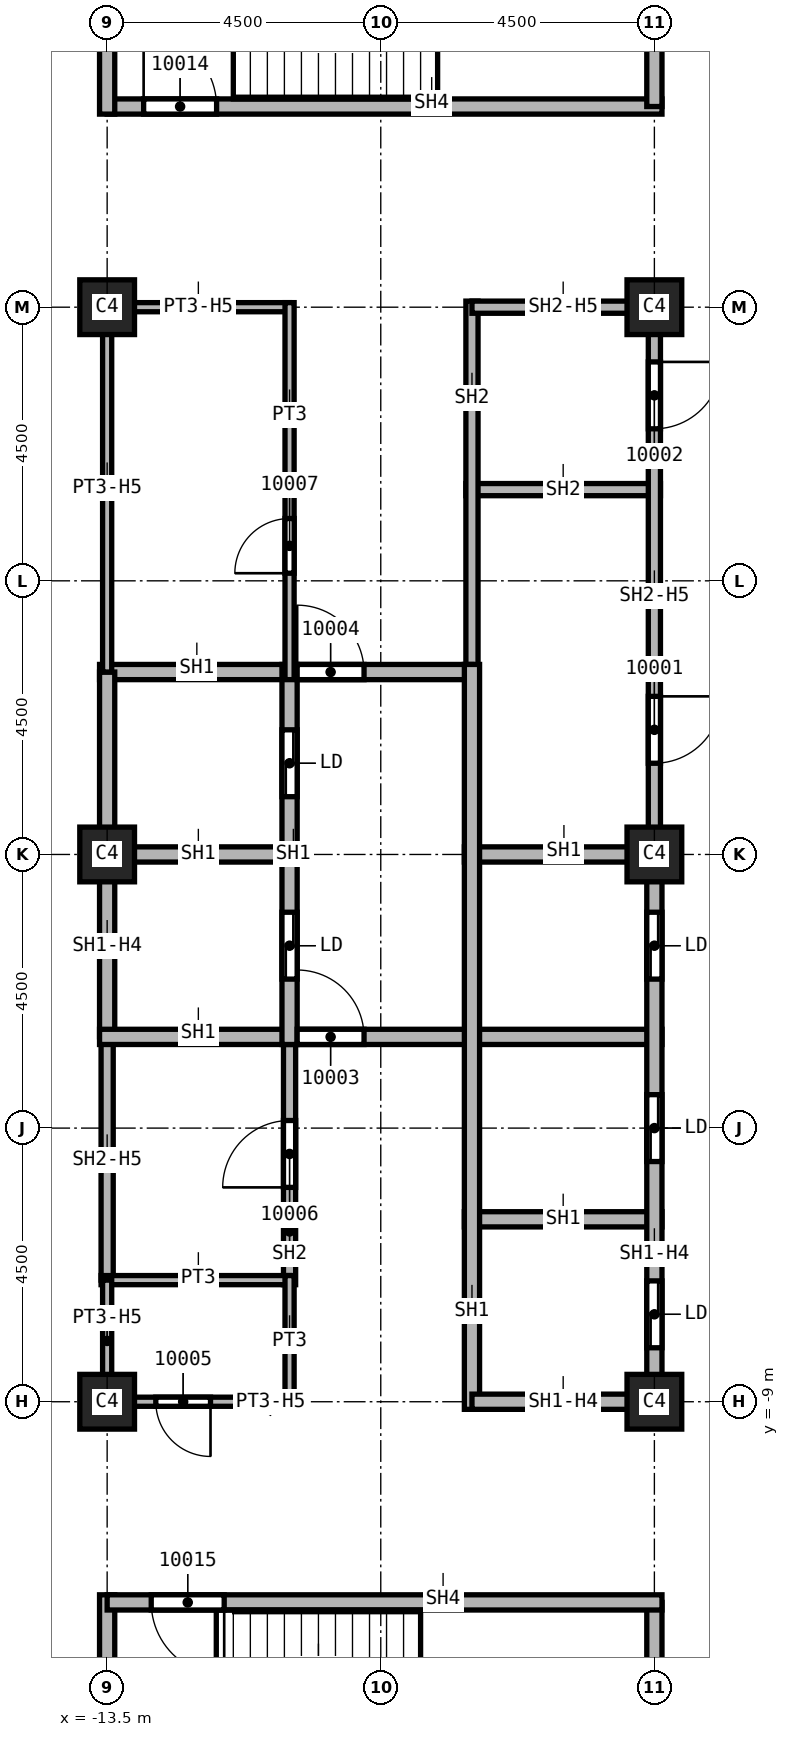
"""IFC4 building model, lengths in metres.
Left out: names, types, materials, properties, quantities, classifications, styles, units other than length and angle.
Written with IfcOpenShell. Run it as: python <this file> out.ifc"""

import sys

from ifc_helpers import new_model, si_unit, direction, frame, frame_2d, origin, origin_2d, place, context, subcontext, project, spatial, rectangle, extrude, element, fill, save


model = new_model("IFC4")
c1 = context("Model", 3, precision=1e-05, world=origin(), true_north=direction((0.0, 1.0)))
c2 = subcontext(c1, "Body", "Model", "MODEL_VIEW")
j1 = project(units=[si_unit("LENGTHUNIT", "METRE"), si_unit("PLANEANGLEUNIT", "RADIAN")], contexts=[c1])
p1 = place(None, origin())
s1 = spatial("IfcSite", under=j1, at=p1, CompositionType="ELEMENT")
p2 = place(p1, origin())
s2 = spatial("IfcBuilding", under=s1, at=p2, CompositionType="ELEMENT")
p3 = place(p2, frame((0.0, 0.0, 174.0)))
s3 = spatial("IfcBuildingStorey", under=s2, at=p3, CompositionType="ELEMENT", Elevation=174.0)
for number, where, z_axis, x_axis in (
    (1, (-4.5, 0.0, 0.0), (0.0, 0.0, 1.0), (1.0, 0.0, 0.0)),
    (2, (-4.5, 9.0, 0.0), (0.0, 0.0, 1.0), (1.0, 0.0, 0.0)),
    (3, (-4.5, -9.0, 0.0), (0.0, 0.0, 1.0), (1.0, 0.0, 0.0)),
    (4, (-13.5, 0.0, 0.0), (0.0, 0.0, 1.0), (1.0, 0.0, 0.0)),
    (5, (-13.5, 9.0, 0.0), (0.0, 0.0, 1.0), (1.0, 0.0, 0.0)),
    (6, (-13.5, -9.0, 0.0), (0.0, 0.0, 1.0), (1.0, 0.0, 0.0)),
):
    element("IfcColumn", number, at=place(p3, frame(where, z_axis=z_axis, x_axis=x_axis)), inside=s3, PredefinedType="COLUMN", context=c2, shape_type="SweptSolid", body=[
        extrude(rectangle(XDim=0.9, YDim=0.9, at=origin_2d()), origin(), (0.0, 0.0, 1.0), 3.59),
    ])
p4 = place(p3, frame((-13.5, -7.0, 0.0), z_axis=(0.0, 0.0, 1.0), x_axis=(0.0, 1.0, 0.0)))
e7 = element("IfcWall", 7, at=p4, inside=s3, PredefinedType="SOLIDWALL", context=c2, shape_type="SweptSolid", body=[
    extrude(rectangle(XDim=4.0, YDim=0.2, at=frame_2d((2.0, 0.0))), origin(), (0.0, 0.0, 1.0), 2.828),
])
p5 = place(p3, frame((-10.5, -7.075, 0.0), z_axis=(0.0, 0.0, 1.0), x_axis=(0.0, 1.0, 0.0)))
e8 = element("IfcWall", 8, at=p5, inside=s3, PredefinedType="SOLIDWALL", context=c2, shape_type="SweptSolid", body=[
    extrude(rectangle(XDim=4.2, YDim=0.2, at=frame_2d((2.1, 0.0))), origin(), (0.0, 0.0, 1.0), 3.59),
])
p6 = place(p5, frame((1.6, 0.0, 0.0)))
e9 = element("IfcOpeningElement", 9, at=p6, cuts=e8, PredefinedType="OPENING", context=c2, shape_type="SweptSolid", body=[
    extrude(rectangle(XDim=1.1, YDim=2.1, at=frame_2d((0.55, 1.05))), frame((0.0, 0.1, 0.0), z_axis=(0.0, -1.0, 0.0), x_axis=(1.0, 0.0, 0.0)), (0.0, 0.0, 1.0), 0.2),
])
p7 = place(p3, frame((-7.6, 6.0, 0.0), z_axis=(0.0, 0.0, 1.0), x_axis=(1.0, 0.0, 0.0)))
e10 = element("IfcWall", 10, at=p7, inside=s3, PredefinedType="SOLIDWALL", context=c2, shape_type="SweptSolid", body=[
    extrude(rectangle(XDim=3.2, YDim=0.2, at=frame_2d((1.6, 0.0))), origin(), (0.0, 0.0, 1.0), 3.59),
])
p8 = place(p3, frame((-7.5, 2.875, 0.0), z_axis=(0.0, 0.0, 1.0), x_axis=(0.0, 1.0, 0.0)))
e11 = element("IfcWall", 11, at=p8, inside=s3, PredefinedType="SOLIDWALL", context=c2, shape_type="SweptSolid", body=[
    extrude(rectangle(XDim=6.225, YDim=0.2, at=frame_2d((3.113, 0.0))), origin(), (0.0, 0.0, 1.0), 3.59),
])
p9 = place(p3, frame((-7.5, 9.0, 0.0), z_axis=(0.0, 0.0, 1.0), x_axis=(1.0, 0.0, 0.0)))
e12 = element("IfcWall", 12, at=p9, inside=s3, PredefinedType="SOLIDWALL", context=c2, shape_type="SweptSolid", body=[
    extrude(rectangle(XDim=3.0, YDim=0.2, at=frame_2d((1.5, 0.0))), origin(), (0.0, 0.0, 1.0), 2.828),
])
p10 = place(p3, frame((-4.5, 9.1, 0.0), z_axis=(0.0, 0.0, 1.0), x_axis=(0.0, -1.0, 0.0)))
e13 = element("IfcWall", 13, at=p10, inside=s3, PredefinedType="SOLIDWALL", context=c2, shape_type="SweptSolid", body=[
    extrude(rectangle(XDim=9.1, YDim=0.2, at=frame_2d((4.55, 0.0))), origin(), (0.0, 0.0, 1.0), 2.828),
])
p11 = place(p10, frame((6.5, 0.0, 0.0)))
e14 = element("IfcOpeningElement", 14, at=p11, cuts=e13, PredefinedType="OPENING", context=c2, shape_type="SweptSolid", body=[
    extrude(rectangle(XDim=1.1, YDim=2.1, at=frame_2d((0.55, 1.05))), frame((0.0, 0.1, 0.0), z_axis=(0.0, -1.0, 0.0), x_axis=(1.0, 0.0, 0.0)), (0.0, 0.0, 1.0), 0.2),
])
p12 = place(p10, frame((1.0, 0.0, 0.0)))
e15 = element("IfcOpeningElement", 15, at=p12, cuts=e13, PredefinedType="OPENING", context=c2, shape_type="SweptSolid", body=[
    extrude(rectangle(XDim=1.1, YDim=2.1, at=frame_2d((0.55, 1.05))), frame((0.0, 0.1, 0.0), z_axis=(0.0, -1.0, 0.0), x_axis=(1.0, 0.0, 0.0)), (0.0, 0.0, 1.0), 0.2),
])
p13 = place(p3, frame((-13.625, 0.0, 0.0), z_axis=(0.0, 0.0, 1.0), x_axis=(1.0, 0.0, 0.0)))
e16 = element("IfcWall", 16, at=p13, inside=s3, PredefinedType="SOLIDWALL", context=c2, shape_type="SweptSolid", body=[
    extrude(rectangle(XDim=3.125, YDim=0.25, at=frame_2d((1.562, 0.0))), origin(), (0.0, 0.0, 1.0), 3.59),
])
p14 = place(p3, frame((-13.625, 3.0, 0.0), z_axis=(0.0, 0.0, 1.0), x_axis=(1.0, 0.0, 0.0)))
e17 = element("IfcWall", 17, at=p14, inside=s3, PredefinedType="SOLIDWALL", context=c2, shape_type="SweptSolid", body=[
    extrude(rectangle(XDim=6.125, YDim=0.25, at=frame_2d((3.062, 0.0))), origin(), (0.0, 0.0, 1.0), 3.59),
])
p15 = place(p14, frame((3.25, 0.0, 0.0)))
e18 = element("IfcOpeningElement", 18, at=p15, cuts=e17, PredefinedType="OPENING", context=c2, shape_type="SweptSolid", body=[
    extrude(rectangle(XDim=1.1, YDim=2.1, at=frame_2d((0.55, 1.05))), frame((0.0, 0.125, 0.0), z_axis=(0.0, -1.0, 0.0), x_axis=(1.0, 0.0, 0.0)), (0.0, 0.0, 1.0), 0.25),
])
p16 = place(p3, frame((-13.5, -3.0, 0.0), z_axis=(0.0, 0.0, 1.0), x_axis=(0.0, 1.0, 0.0)))
e19 = element("IfcWall", 19, at=p16, inside=s3, PredefinedType="SOLIDWALL", context=c2, shape_type="SweptSolid", body=[
    extrude(rectangle(XDim=6.0, YDim=0.25, at=frame_2d((3.0, 0.0))), origin(), (0.0, 0.0, 1.0), 2.828),
])
p17 = place(p3, frame((-13.625, -3.0, 0.0), z_axis=(0.0, 0.0, 1.0), x_axis=(1.0, 0.0, 0.0)))
e20 = element("IfcWall", 20, at=p17, inside=s3, PredefinedType="SOLIDWALL", context=c2, shape_type="SweptSolid", body=[
    extrude(rectangle(XDim=9.25, YDim=0.25, at=frame_2d((4.625, 0.0))), origin(), (0.0, 0.0, 1.0), 3.59),
])
p18 = place(p17, frame((3.25, 0.0, 0.0)))
e21 = element("IfcOpeningElement", 21, at=p18, cuts=e20, PredefinedType="OPENING", context=c2, shape_type="SweptSolid", body=[
    extrude(rectangle(XDim=1.1, YDim=2.1, at=frame_2d((0.55, 1.05))), frame((0.0, 0.125, 0.0), z_axis=(0.0, -1.0, 0.0), x_axis=(1.0, 0.0, 0.0)), (0.0, 0.0, 1.0), 0.25),
])
p19 = place(p3, frame((-10.5, -3.125, 0.0), z_axis=(0.0, 0.0, 1.0), x_axis=(0.0, 1.0, 0.0)))
e22 = element("IfcWall", 22, at=p19, inside=s3, PredefinedType="SOLIDWALL", context=c2, shape_type="SweptSolid", body=[
    extrude(rectangle(XDim=6.25, YDim=0.25, at=frame_2d((3.125, 0.0))), origin(), (0.0, 0.0, 1.0), 3.59),
])
p20 = place(p19, frame((1.075, 0.0, 0.0)))
e23 = element("IfcOpeningElement", 23, at=p20, cuts=e22, PredefinedType="OPENING", context=c2, shape_type="SweptSolid", body=[
    extrude(rectangle(XDim=1.1, YDim=2.1, at=frame_2d((0.55, 1.05))), frame((0.0, 0.125, 0.0), z_axis=(0.0, -1.0, 0.0), x_axis=(1.0, 0.0, 0.0)), (0.0, 0.0, 1.0), 0.25),
])
p21 = place(p19, frame((4.075, 0.0, 0.0)))
e24 = element("IfcOpeningElement", 24, at=p21, cuts=e22, PredefinedType="OPENING", context=c2, shape_type="SweptSolid", body=[
    extrude(rectangle(XDim=1.1, YDim=2.1, at=frame_2d((0.55, 1.05))), frame((0.0, 0.125, 0.0), z_axis=(0.0, -1.0, 0.0), x_axis=(1.0, 0.0, 0.0)), (0.0, 0.0, 1.0), 0.25),
])
for number, where, z_axis, x_axis in (
    (25, (-7.625, -6.0, 0.0), (0.0, 0.0, 1.0), (1.0, 0.0, 0.0)),
    (26, (-7.625, 0.0, 0.0), (0.0, 0.0, 1.0), (1.0, 0.0, 0.0)),
):
    element("IfcWall", number, at=place(p3, frame(where, z_axis=z_axis, x_axis=x_axis)), inside=s3, PredefinedType="SOLIDWALL", context=c2, shape_type="SweptSolid", body=[
        extrude(rectangle(XDim=3.25, YDim=0.25, at=frame_2d((1.625, 0.0))), origin(), (0.0, 0.0, 1.0), 3.59),
    ])
p22 = place(p3, frame((-7.5, -9.125, 0.0), z_axis=(0.0, 0.0, 1.0), x_axis=(0.0, 1.0, 0.0)))
e27 = element("IfcWall", 27, at=p22, inside=s3, PredefinedType="SOLIDWALL", context=c2, shape_type="SweptSolid", body=[
    extrude(rectangle(XDim=12.25, YDim=0.25, at=frame_2d((6.125, 0.0))), origin(), (0.0, 0.0, 1.0), 3.59),
])
p23 = place(p3, frame((-4.5, -9.0, 0.0), z_axis=(0.0, 0.0, 1.0), x_axis=(-1.0, 0.0, 0.0)))
e28 = element("IfcWall", 28, at=p23, inside=s3, PredefinedType="SOLIDWALL", context=c2, shape_type="SweptSolid", body=[
    extrude(rectangle(XDim=3.0, YDim=0.25, at=frame_2d((1.5, 0.0))), origin(), (0.0, 0.0, 1.0), 2.828),
])
p24 = place(p3, frame((-4.5, 0.0, 0.0), z_axis=(0.0, 0.0, 1.0), x_axis=(0.0, -1.0, 0.0)))
e29 = element("IfcWall", 29, at=p24, inside=s3, PredefinedType="SOLIDWALL", context=c2, shape_type="SweptSolid", body=[
    extrude(rectangle(XDim=9.125, YDim=0.25, at=frame_2d((4.562, 0.0))), origin(), (0.0, 0.0, 1.0), 2.828),
])
p25 = place(p24, frame((7.012, 0.0, 0.0)))
e30 = element("IfcOpeningElement", 30, at=p25, cuts=e29, PredefinedType="OPENING", context=c2, shape_type="SweptSolid", body=[
    extrude(rectangle(XDim=1.1, YDim=2.1, at=frame_2d((0.55, 1.05))), frame((0.0, 0.125, 0.0), z_axis=(0.0, -1.0, 0.0), x_axis=(1.0, 0.0, 0.0)), (0.0, 0.0, 1.0), 0.25),
])
p26 = place(p24, frame((3.95, 0.0, 0.0)))
e31 = element("IfcOpeningElement", 31, at=p26, cuts=e29, PredefinedType="OPENING", context=c2, shape_type="SweptSolid", body=[
    extrude(rectangle(XDim=1.1, YDim=2.1, at=frame_2d((0.55, 1.05))), frame((0.0, 0.125, 0.0), z_axis=(0.0, -1.0, 0.0), x_axis=(1.0, 0.0, 0.0)), (0.0, 0.0, 1.0), 0.25),
])
p27 = place(p24, frame((0.95, 0.0, 0.0)))
e32 = element("IfcOpeningElement", 32, at=p27, cuts=e29, PredefinedType="OPENING", context=c2, shape_type="SweptSolid", body=[
    extrude(rectangle(XDim=1.1, YDim=2.1, at=frame_2d((0.55, 1.05))), frame((0.0, 0.125, 0.0), z_axis=(0.0, -1.0, 0.0), x_axis=(1.0, 0.0, 0.0)), (0.0, 0.0, 1.0), 0.25),
])
p28 = place(p3, frame((-13.5, -12.175, 0.0), z_axis=(0.0, 0.0, 1.0), x_axis=(0.0, -1.0, 0.0)))
e33 = element("IfcWall", 33, at=p28, inside=s3, PredefinedType="SOLIDWALL", context=c2, shape_type="SweptSolid", body=[
    extrude(rectangle(XDim=4.75, YDim=0.25, at=frame_2d((2.375, 0.0))), origin(), (0.0, 0.0, 1.0), 3.59),
])
p29 = place(p3, frame((-13.5, 12.3, 0.0), z_axis=(0.0, 0.0, 1.0), x_axis=(1.0, 0.0, 0.0)))
e34 = element("IfcWall", 34, at=p29, inside=s3, PredefinedType="SOLIDWALL", context=c2, shape_type="SweptSolid", body=[
    extrude(rectangle(XDim=9.125, YDim=0.25, at=frame_2d((4.562, 0.0))), origin(), (0.0, 0.0, 1.0), 3.59),
])
p30 = place(p29, frame((0.6, 0.0, 0.0)))
e35 = element("IfcOpeningElement", 35, at=p30, cuts=e34, PredefinedType="OPENING", context=c2, shape_type="SweptSolid", body=[
    extrude(rectangle(XDim=1.2, YDim=2.1, at=frame_2d((0.6, 1.05))), frame((0.0, 0.125, 0.0), z_axis=(0.0, -1.0, 0.0), x_axis=(1.0, 0.0, 0.0)), (0.0, 0.0, 1.0), 0.25),
])
p31 = place(p3, frame((-13.5, 12.175, 0.0), z_axis=(0.0, 0.0, 1.0), x_axis=(0.0, 1.0, 0.0)))
e36 = element("IfcWall", 36, at=p31, inside=s3, PredefinedType="SOLIDWALL", context=c2, shape_type="SweptSolid", body=[
    extrude(rectangle(XDim=4.75, YDim=0.25, at=frame_2d((2.375, 0.0))), origin(), (0.0, 0.0, 1.0), 3.59),
])
p32 = place(p3, frame((-4.5, -12.3, 0.0), z_axis=(0.0, 0.0, 1.0), x_axis=(0.0, -1.0, 0.0)))
e37 = element("IfcWall", 37, at=p32, inside=s3, PredefinedType="SOLIDWALL", context=c2, shape_type="SweptSolid", body=[
    extrude(rectangle(XDim=4.625, YDim=0.25, at=frame_2d((2.312, 0.0))), origin(), (0.0, 0.0, 1.0), 3.59),
])
p33 = place(p3, frame((-4.5, 16.8, 0.0), z_axis=(0.0, 0.0, 1.0), x_axis=(0.0, -1.0, 0.0)))
e38 = element("IfcWall", 38, at=p33, inside=s3, PredefinedType="SOLIDWALL", context=c2, shape_type="SweptSolid", body=[
    extrude(rectangle(XDim=4.5, YDim=0.25, at=frame_2d((2.25, 0.0))), origin(), (0.0, 0.0, 1.0), 3.59),
])
p34 = place(p3, frame((-4.375, -12.3, 0.0), z_axis=(0.0, 0.0, 1.0), x_axis=(-1.0, 0.0, 0.0)))
e39 = element("IfcWall", 39, at=p34, inside=s3, PredefinedType="SOLIDWALL", context=c2, shape_type="SweptSolid", body=[
    extrude(rectangle(XDim=9.125, YDim=0.25, at=frame_2d((4.562, 0.0))), origin(), (0.0, 0.0, 1.0), 3.59),
])
p35 = place(p34, frame((7.2, 0.0, 0.0)))
e40 = element("IfcOpeningElement", 40, at=p35, cuts=e39, PredefinedType="OPENING", context=c2, shape_type="SweptSolid", body=[
    extrude(rectangle(XDim=1.2, YDim=2.1, at=frame_2d((0.6, 1.05))), frame((0.0, 0.125, 0.0), z_axis=(0.0, -1.0, 0.0), x_axis=(1.0, 0.0, 0.0)), (0.0, 0.0, 1.0), 0.25),
])
p36 = place(p3, frame((-13.6, -7.0, 0.0), z_axis=(0.0, 0.0, 1.0), x_axis=(1.0, 0.0, 0.0)))
e41 = element("IfcWall", 41, at=p36, inside=s3, PredefinedType="PARTITIONING", context=c2, shape_type="SweptSolid", body=[
    extrude(rectangle(XDim=3.1, YDim=0.15, at=frame_2d((1.55, 0.0))), origin(), (0.0, 0.0, 1.0), 3.59),
])
p37 = place(p3, frame((-13.5, -9.075, 0.0), z_axis=(0.0, 0.0, 1.0), x_axis=(0.0, 1.0, 0.0)))
e42 = element("IfcWall", 42, at=p37, inside=s3, PredefinedType="PARTITIONING", context=c2, shape_type="SweptSolid", body=[
    extrude(rectangle(XDim=2.075, YDim=0.15, at=frame_2d((1.038, 0.0))), origin(), (0.0, 0.0, 1.0), 2.828),
])
p38 = place(p3, frame((-13.5, 3.0, 0.0), z_axis=(0.0, 0.0, 1.0), x_axis=(0.0, 1.0, 0.0)))
e43 = element("IfcWall", 43, at=p38, inside=s3, PredefinedType="PARTITIONING", context=c2, shape_type="SweptSolid", body=[
    extrude(rectangle(XDim=6.075, YDim=0.15, at=frame_2d((3.038, 0.0))), origin(), (0.0, 0.0, 1.0), 2.828),
])
p39 = place(p3, frame((-13.5, 9.0, 0.0), z_axis=(0.0, 0.0, 1.0), x_axis=(1.0, 0.0, 0.0)))
e44 = element("IfcWall", 44, at=p39, inside=s3, PredefinedType="PARTITIONING", context=c2, shape_type="SweptSolid", body=[
    extrude(rectangle(XDim=3.0, YDim=0.15, at=frame_2d((1.5, 0.0))), origin(), (0.0, 0.0, 1.0), 2.828),
])
p40 = place(p3, frame((-10.5, -9.075, 0.0), z_axis=(0.0, 0.0, 1.0), x_axis=(0.0, 1.0, 0.0)))
e45 = element("IfcWall", 45, at=p40, inside=s3, PredefinedType="PARTITIONING", context=c2, shape_type="SweptSolid", body=[
    extrude(rectangle(XDim=2.15, YDim=0.15, at=frame_2d((1.075, 0.0))), origin(), (0.0, 0.0, 1.0), 3.59),
])
p41 = place(p3, frame((-10.5, -9.0, 0.0), z_axis=(0.0, 0.0, 1.0), x_axis=(-1.0, 0.0, 0.0)))
e46 = element("IfcWall", 46, at=p41, inside=s3, PredefinedType="PARTITIONING", context=c2, shape_type="SweptSolid", body=[
    extrude(rectangle(XDim=3.0, YDim=0.15, at=frame_2d((1.5, 0.0))), origin(), (0.0, 0.0, 1.0), 2.828),
])
p42 = place(p41, frame((1.3, 0.0, 0.0)))
e47 = element("IfcOpeningElement", 47, at=p42, cuts=e46, PredefinedType="OPENING", context=c2, shape_type="SweptSolid", body=[
    extrude(rectangle(XDim=0.9, YDim=2.1, at=frame_2d((0.45, 1.05))), frame((0.0, 0.075, 0.0), z_axis=(0.0, -1.0, 0.0), x_axis=(1.0, 0.0, 0.0)), (0.0, 0.0, 1.0), 0.15),
])
p43 = place(p3, frame((-10.5, 2.875, 0.0), z_axis=(0.0, 0.0, 1.0), x_axis=(0.0, 1.0, 0.0)))
e48 = element("IfcWall", 48, at=p43, inside=s3, PredefinedType="PARTITIONING", context=c2, shape_type="SweptSolid", body=[
    extrude(rectangle(XDim=6.2, YDim=0.15, at=frame_2d((3.1, 0.0))), origin(), (0.0, 0.0, 1.0), 3.59),
])
p44 = place(p43, frame((1.75, 0.0, 0.0)))
e49 = element("IfcOpeningElement", 49, at=p44, cuts=e48, PredefinedType="OPENING", context=c2, shape_type="SweptSolid", body=[
    extrude(rectangle(XDim=0.9, YDim=2.1, at=frame_2d((0.45, 1.05))), frame((0.0, 0.075, 0.0), z_axis=(0.0, -1.0, 0.0), x_axis=(1.0, 0.0, 0.0)), (0.0, 0.0, 1.0), 0.15),
])
p45 = place(p11, origin())
e50 = element("IfcDoor", 50, at=p45, inside=s3, OperationType="SINGLE_SWING_RIGHT", PredefinedType="DOOR", context=c2, shape_type="SweptSolid", body=[
    extrude(rectangle(XDim=1.1, YDim=2.1, at=frame_2d((0.55, 1.05))), frame((0.0, 0.025, 0.0), z_axis=(0.0, -1.0, 0.0), x_axis=(1.0, 0.0, 0.0)), (0.0, 0.0, 1.0), 0.05),
])
fill(e14, e50)
p46 = place(p12, origin())
e51 = element("IfcDoor", 51, at=p46, inside=s3, OperationType="SINGLE_SWING_LEFT", PredefinedType="DOOR", context=c2, shape_type="SweptSolid", body=[
    extrude(rectangle(XDim=1.1, YDim=2.1, at=frame_2d((0.55, 1.05))), frame((0.0, 0.025, 0.0), z_axis=(0.0, -1.0, 0.0), x_axis=(1.0, 0.0, 0.0)), (0.0, 0.0, 1.0), 0.05),
])
fill(e15, e51)
p47 = place(p18, origin())
e52 = element("IfcDoor", 52, at=p47, inside=s3, OperationType="SINGLE_SWING_RIGHT", PredefinedType="DOOR", context=c2, shape_type="SweptSolid", body=[
    extrude(rectangle(XDim=1.1, YDim=2.1, at=frame_2d((0.55, 1.05))), frame((0.0, 0.025, 0.0), z_axis=(0.0, -1.0, 0.0), x_axis=(1.0, 0.0, 0.0)), (0.0, 0.0, 1.0), 0.05),
])
fill(e21, e52)
p48 = place(p15, origin())
e53 = element("IfcDoor", 53, at=p48, inside=s3, OperationType="SINGLE_SWING_LEFT", PredefinedType="DOOR", context=c2, shape_type="SweptSolid", body=[
    extrude(rectangle(XDim=1.1, YDim=2.1, at=frame_2d((0.55, 1.05))), frame((0.0, 0.025, 0.0), z_axis=(0.0, -1.0, 0.0), x_axis=(1.0, 0.0, 0.0)), (0.0, 0.0, 1.0), 0.05),
])
fill(e18, e53)
p49 = place(p42, origin())
e54 = element("IfcDoor", 54, at=p49, inside=s3, OperationType="SINGLE_SWING_RIGHT", PredefinedType="DOOR", context=c2, shape_type="SweptSolid", body=[
    extrude(rectangle(XDim=0.9, YDim=2.1, at=frame_2d((0.45, 1.05))), frame((0.0, 0.025, 0.0), z_axis=(0.0, -1.0, 0.0), x_axis=(1.0, 0.0, 0.0)), (0.0, 0.0, 1.0), 0.05),
])
fill(e47, e54)
p50 = place(p6, origin())
e55 = element("IfcDoor", 55, at=p50, inside=s3, OperationType="SINGLE_SWING_LEFT", PredefinedType="DOOR", context=c2, shape_type="SweptSolid", body=[
    extrude(rectangle(XDim=1.1, YDim=2.1, at=frame_2d((0.55, 1.05))), frame((0.0, 0.025, 0.0), z_axis=(0.0, -1.0, 0.0), x_axis=(1.0, 0.0, 0.0)), (0.0, 0.0, 1.0), 0.05),
])
fill(e9, e55)
p51 = place(p44, origin())
e56 = element("IfcDoor", 56, at=p51, inside=s3, OperationType="SINGLE_SWING_RIGHT", PredefinedType="DOOR", context=c2, shape_type="SweptSolid", body=[
    extrude(rectangle(XDim=0.9, YDim=2.1, at=frame_2d((0.45, 1.05))), frame((0.0, 0.025, 0.0), z_axis=(0.0, -1.0, 0.0), x_axis=(1.0, 0.0, 0.0)), (0.0, 0.0, 1.0), 0.05),
])
fill(e49, e56)
p52 = place(p30, origin())
e57 = element("IfcDoor", 57, at=p52, inside=s3, OperationType="SINGLE_SWING_LEFT", PredefinedType="DOOR", context=c2, shape_type="SweptSolid", body=[
    extrude(rectangle(XDim=1.2, YDim=2.1, at=frame_2d((0.6, 1.05))), frame((0.0, 0.025, 0.0), z_axis=(0.0, -1.0, 0.0), x_axis=(1.0, 0.0, 0.0)), (0.0, 0.0, 1.0), 0.05),
])
fill(e35, e57)
p53 = place(p35, origin())
e58 = element("IfcDoor", 58, at=p53, inside=s3, OperationType="SINGLE_SWING_RIGHT", PredefinedType="DOOR", context=c2, shape_type="SweptSolid", body=[
    extrude(rectangle(XDim=1.2, YDim=2.1, at=frame_2d((0.6, 1.05))), frame((0.0, 0.025, 0.0), z_axis=(0.0, -1.0, 0.0), x_axis=(1.0, 0.0, 0.0)), (0.0, 0.0, 1.0), 0.05),
])
fill(e40, e58)
p54 = place(p25, origin())
e59 = element("IfcDoor", 59, at=p54, inside=s3, OperationType="SLIDING_TO_LEFT", PredefinedType="DOOR", context=c2, shape_type="SweptSolid", body=[
    extrude(rectangle(XDim=1.1, YDim=2.1, at=frame_2d((0.55, 1.05))), frame((0.0, 0.025, 0.0), z_axis=(0.0, -1.0, 0.0), x_axis=(1.0, 0.0, 0.0)), (0.0, 0.0, 1.0), 0.05),
])
fill(e30, e59)
p55 = place(p26, origin())
e60 = element("IfcDoor", 60, at=p55, inside=s3, OperationType="SLIDING_TO_LEFT", PredefinedType="DOOR", context=c2, shape_type="SweptSolid", body=[
    extrude(rectangle(XDim=1.1, YDim=2.1, at=frame_2d((0.55, 1.05))), frame((0.0, 0.025, 0.0), z_axis=(0.0, -1.0, 0.0), x_axis=(1.0, 0.0, 0.0)), (0.0, 0.0, 1.0), 0.05),
])
fill(e31, e60)
p56 = place(p27, origin())
e61 = element("IfcDoor", 61, at=p56, inside=s3, OperationType="SLIDING_TO_LEFT", PredefinedType="DOOR", context=c2, shape_type="SweptSolid", body=[
    extrude(rectangle(XDim=1.1, YDim=2.1, at=frame_2d((0.55, 1.05))), frame((0.0, 0.025, 0.0), z_axis=(0.0, -1.0, 0.0), x_axis=(1.0, 0.0, 0.0)), (0.0, 0.0, 1.0), 0.05),
])
fill(e32, e61)
p57 = place(p20, origin())
e62 = element("IfcDoor", 62, at=p57, inside=s3, OperationType="SLIDING_TO_LEFT", PredefinedType="DOOR", context=c2, shape_type="SweptSolid", body=[
    extrude(rectangle(XDim=1.1, YDim=2.1, at=frame_2d((0.55, 1.05))), frame((0.0, 0.025, 0.0), z_axis=(0.0, -1.0, 0.0), x_axis=(1.0, 0.0, 0.0)), (0.0, 0.0, 1.0), 0.05),
])
fill(e23, e62)
p58 = place(p21, origin())
e63 = element("IfcDoor", 63, at=p58, inside=s3, OperationType="SLIDING_TO_LEFT", PredefinedType="DOOR", context=c2, shape_type="SweptSolid", body=[
    extrude(rectangle(XDim=1.1, YDim=2.1, at=frame_2d((0.55, 1.05))), frame((0.0, 0.025, 0.0), z_axis=(0.0, -1.0, 0.0), x_axis=(1.0, 0.0, 0.0)), (0.0, 0.0, 1.0), 0.05),
])
fill(e24, e63)
save(model, sys.argv[1])
